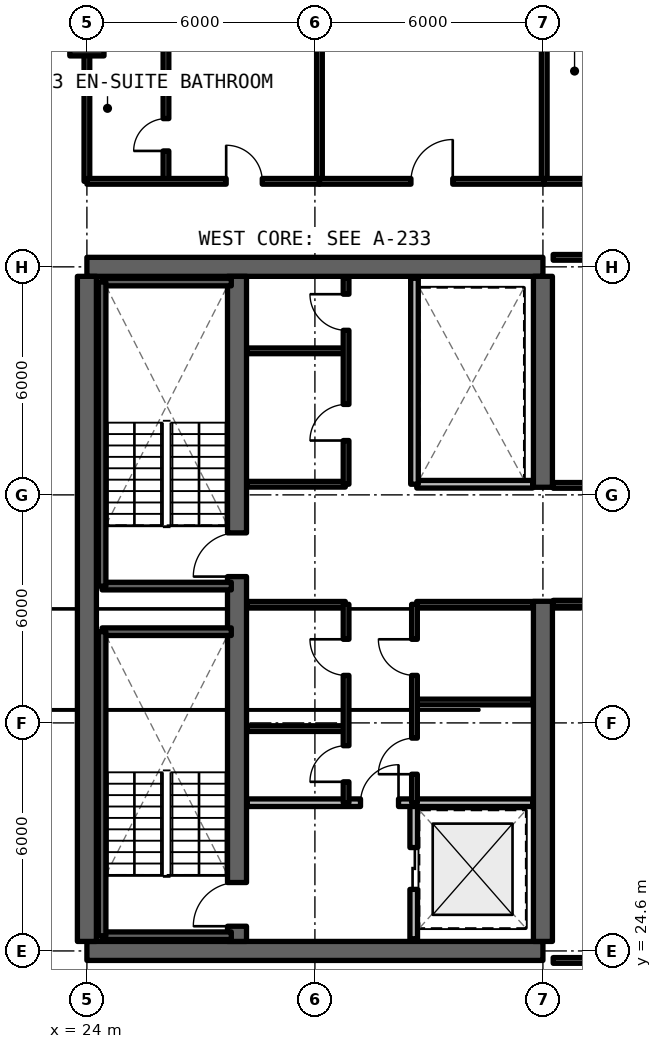
"""IFC4 building model, lengths in metres.
Left out: names, types, materials, properties, quantities, classifications, styles, units other than length and angle.
Written with IfcOpenShell. Run it as: python <this file> out.ifc"""

import sys

from ifc_helpers import new_model, si_unit, direction, frame, frame_2d, origin, origin_2d, place, context, subcontext, project, spatial, rectangle, extrude, element, fill, save


model = new_model("IFC4")
c1 = context("Model", 3, precision=1e-05, world=origin(), true_north=direction((0.0, 1.0)))
c2 = subcontext(c1, "Body", "Model", "MODEL_VIEW")
j1 = project(units=[si_unit("LENGTHUNIT", "METRE"), si_unit("PLANEANGLEUNIT", "RADIAN")], contexts=[c1])
p1 = place(None, origin())
s1 = spatial("IfcSite", under=j1, at=p1, CompositionType="ELEMENT")
p2 = place(p1, origin())
s2 = spatial("IfcBuilding", under=s1, at=p2, CompositionType="ELEMENT")
p3 = place(p2, frame((0.0, 0.0, 145.2)))
s3 = spatial("IfcBuildingStorey", under=s2, at=p3, CompositionType="ELEMENT", Elevation=145.2)
for number, where, z_axis, x_axis in (
    (1, (24.0, 24.6, 0.0), (0.0, 0.0, 1.0), (1.0, 0.0, 0.0)),
    (2, (36.0, 42.6, 0.0), (0.0, 0.0, 1.0), (-1.0, 0.0, 0.0)),
):
    element("IfcWall", number, at=place(p3, frame(where, z_axis=z_axis, x_axis=x_axis)), inside=s3, PredefinedType="SHEAR", context=c2, shape_type="SweptSolid", body=[
        extrude(rectangle(XDim=12.0, YDim=0.5, at=frame_2d((6.0, 0.0))), origin(), (0.0, 0.0, 1.0), 3.3),
    ])
p4 = place(p3, frame((24.0, 24.85, 0.0), z_axis=(0.0, 0.0, 1.0), x_axis=(0.0, 1.0, 0.0)))
e3 = element("IfcWall", 3, at=p4, inside=s3, PredefinedType="SHEAR", context=c2, shape_type="SweptSolid", body=[
    extrude(rectangle(XDim=17.5, YDim=0.5, at=frame_2d((8.75, 0.0))), origin(), (0.0, 0.0, 1.0), 3.3),
])
p5 = place(p3, frame((36.0, 24.85, 0.0), z_axis=(0.0, 0.0, 1.0), x_axis=(0.0, 1.0, 0.0)))
e4 = element("IfcWall", 4, at=p5, inside=s3, PredefinedType="SHEAR", context=c2, shape_type="SweptSolid", body=[
    extrude(rectangle(XDim=8.95, YDim=0.5, at=frame_2d((4.475, 0.0))), origin(), (0.0, 0.0, 1.0), 3.3),
])
p6 = place(p3, frame((36.0, 36.8, 0.0), z_axis=(0.0, 0.0, 1.0), x_axis=(0.0, 1.0, 0.0)))
e5 = element("IfcWall", 5, at=p6, inside=s3, PredefinedType="SHEAR", context=c2, shape_type="SweptSolid", body=[
    extrude(rectangle(XDim=5.55, YDim=0.5, at=frame_2d((2.775, 0.0))), origin(), (0.0, 0.0, 1.0), 3.3),
])
p7 = place(p3, frame((27.95, 24.85, 0.0), z_axis=(0.0, 0.0, 1.0), x_axis=(0.0, 1.0, 0.0)))
e6 = element("IfcWall", 6, at=p7, inside=s3, PredefinedType="SHEAR", context=c2, shape_type="SweptSolid", body=[
    extrude(rectangle(XDim=17.5, YDim=0.5, at=frame_2d((8.75, 0.0))), origin(), (0.0, 0.0, 1.0), 3.3),
])
p8 = place(p7, frame((0.4, 0.0, 0.0)))
e7 = element("IfcOpeningElement", 7, at=p8, cuts=e6, PredefinedType="OPENING", context=c2, shape_type="SweptSolid", body=[
    extrude(rectangle(XDim=1.15, YDim=2.15, at=frame_2d((0.575, 1.075))), frame((0.0, 0.26, 0.0), z_axis=(0.0, -1.0, 0.0), x_axis=(1.0, 0.0, 0.0)), (0.0, 0.0, 1.0), 0.52),
])
p9 = place(p7, frame((9.6, 0.0, 0.0)))
e8 = element("IfcOpeningElement", 8, at=p9, cuts=e6, PredefinedType="OPENING", context=c2, shape_type="SweptSolid", body=[
    extrude(rectangle(XDim=1.15, YDim=2.15, at=frame_2d((0.575, 1.075))), frame((0.0, 0.26, 0.0), z_axis=(0.0, -1.0, 0.0), x_axis=(1.0, 0.0, 0.0)), (0.0, 0.0, 1.0), 0.52),
])
p10 = place(p3, frame((24.0, 48.6, 0.0), z_axis=(0.0, 0.0, 1.0), x_axis=(1.0, 0.0, 0.0)))
e9 = element("IfcColumn", 9, at=p10, inside=s3, PredefinedType="COLUMN", context=c2, shape_type="SweptSolid", body=[
    extrude(rectangle(XDim=0.9, YDim=0.9, at=origin_2d()), origin(), (0.0, 0.0, 1.0), 3.3),
])
p11 = place(p3, frame((32.6, 24.92, 0.0), z_axis=(0.0, 0.0, 1.0), x_axis=(0.0, 1.0, 0.0)))
e10 = element("IfcWall", 10, at=p11, inside=s3, PredefinedType="SOLIDWALL", context=c2, shape_type="SweptSolid", body=[
    extrude(rectangle(XDim=3.58, YDim=0.2, at=frame_2d((1.79, 0.0))), origin(), (0.0, 0.0, 1.0), 2.35),
])
p12 = place(p11, frame((1.3, 0.0, 0.0)))
e11 = element("IfcOpeningElement", 11, at=p12, cuts=e10, PredefinedType="OPENING", context=c2, shape_type="SweptSolid", body=[
    extrude(rectangle(XDim=1.1, YDim=2.2, at=frame_2d((0.55, 1.1))), frame((0.0, 0.11, 0.0), z_axis=(0.0, -1.0, 0.0), x_axis=(1.0, 0.0, 0.0)), (0.0, 0.0, 1.0), 0.22),
])
p13 = place(p3, frame((28.22, 28.5, 0.0), z_axis=(0.0, 0.0, 1.0), x_axis=(1.0, 0.0, 0.0)))
e12 = element("IfcWall", 12, at=p13, inside=s3, PredefinedType="SOLIDWALL", context=c2, shape_type="SweptSolid", body=[
    extrude(rectangle(XDim=7.51, YDim=0.2, at=frame_2d((3.755, 0.0))), origin(), (0.0, 0.0, 1.0), 2.35),
])
p14 = place(p13, frame((2.98, 0.0, 0.0)))
e13 = element("IfcOpeningElement", 13, at=p14, cuts=e12, PredefinedType="OPENING", context=c2, shape_type="SweptSolid", body=[
    extrude(rectangle(XDim=1.0, YDim=2.15, at=frame_2d((0.5, 1.075))), frame((0.0, 0.11, 0.0), z_axis=(0.0, -1.0, 0.0), x_axis=(1.0, 0.0, 0.0)), (0.0, 0.0, 1.0), 0.22),
])
for number, where, z_axis, x_axis in (
    (14, (28.22, 30.45, 0.0), (0.0, 0.0, 1.0), (1.0, 0.0, 0.0)),
    (15, (28.22, 33.72, 0.0), (0.0, 0.0, 1.0), (1.0, 0.0, 0.0)),
):
    element("IfcWall", number, at=place(p3, frame(where, z_axis=z_axis, x_axis=x_axis)), inside=s3, PredefinedType="SOLIDWALL", context=c2, shape_type="SweptSolid", body=[
        extrude(rectangle(XDim=2.58, YDim=0.15, at=frame_2d((1.29, 0.0))), origin(), (0.0, 0.0, 1.0), 2.35),
    ])
p15 = place(p3, frame((30.82, 28.5, 0.0), z_axis=(0.0, 0.0, 1.0), x_axis=(0.0, 1.0, 0.0)))
e16 = element("IfcWall", 16, at=p15, inside=s3, PredefinedType="SOLIDWALL", context=c2, shape_type="SweptSolid", body=[
    extrude(rectangle(XDim=5.22, YDim=0.15, at=frame_2d((2.61, 0.0))), origin(), (0.0, 0.0, 1.0), 2.35),
])
p16 = place(p15, frame((0.55, 0.0, 0.0)))
e17 = element("IfcOpeningElement", 17, at=p16, cuts=e16, PredefinedType="OPENING", context=c2, shape_type="SweptSolid", body=[
    extrude(rectangle(XDim=0.95, YDim=2.15, at=frame_2d((0.475, 1.075))), frame((0.0, 0.085, 0.0), z_axis=(0.0, -1.0, 0.0), x_axis=(1.0, 0.0, 0.0)), (0.0, 0.0, 1.0), 0.17),
])
p17 = place(p15, frame((3.35, 0.0, 0.0)))
e18 = element("IfcOpeningElement", 18, at=p17, cuts=e16, PredefinedType="OPENING", context=c2, shape_type="SweptSolid", body=[
    extrude(rectangle(XDim=0.95, YDim=2.15, at=frame_2d((0.475, 1.075))), frame((0.0, 0.085, 0.0), z_axis=(0.0, -1.0, 0.0), x_axis=(1.0, 0.0, 0.0)), (0.0, 0.0, 1.0), 0.17),
])
for number, where, z_axis, x_axis in (
    (19, (32.68, 31.15, 0.0), (0.0, 0.0, 1.0), (1.0, 0.0, 0.0)),
    (20, (32.68, 33.72, 0.0), (0.0, 0.0, 1.0), (1.0, 0.0, 0.0)),
):
    element("IfcWall", number, at=place(p3, frame(where, z_axis=z_axis, x_axis=x_axis)), inside=s3, PredefinedType="SOLIDWALL", context=c2, shape_type="SweptSolid", body=[
        extrude(rectangle(XDim=3.05, YDim=0.15, at=frame_2d((1.525, 0.0))), origin(), (0.0, 0.0, 1.0), 2.35),
    ])
p18 = place(p3, frame((32.62, 28.5, 0.0), z_axis=(0.0, 0.0, 1.0), x_axis=(0.0, 1.0, 0.0)))
e21 = element("IfcWall", 21, at=p18, inside=s3, PredefinedType="SOLIDWALL", context=c2, shape_type="SweptSolid", body=[
    extrude(rectangle(XDim=5.22, YDim=0.15, at=frame_2d((2.61, 0.0))), origin(), (0.0, 0.0, 1.0), 2.35),
])
p19 = place(p18, frame((0.75, 0.0, 0.0)))
e22 = element("IfcOpeningElement", 22, at=p19, cuts=e21, PredefinedType="OPENING", context=c2, shape_type="SweptSolid", body=[
    extrude(rectangle(XDim=0.95, YDim=2.15, at=frame_2d((0.475, 1.075))), frame((0.0, 0.085, 0.0), z_axis=(0.0, -1.0, 0.0), x_axis=(1.0, 0.0, 0.0)), (0.0, 0.0, 1.0), 0.17),
])
p20 = place(p18, frame((3.35, 0.0, 0.0)))
e23 = element("IfcOpeningElement", 23, at=p20, cuts=e21, PredefinedType="OPENING", context=c2, shape_type="SweptSolid", body=[
    extrude(rectangle(XDim=0.95, YDim=2.15, at=frame_2d((0.475, 1.075))), frame((0.0, 0.085, 0.0), z_axis=(0.0, -1.0, 0.0), x_axis=(1.0, 0.0, 0.0)), (0.0, 0.0, 1.0), 0.17),
])
for number, where, z_axis, x_axis in (
    (24, (28.22, 36.88, 0.0), (0.0, 0.0, 1.0), (1.0, 0.0, 0.0)),
    (25, (28.22, 40.39, 0.0), (0.0, 0.0, 1.0), (1.0, 0.0, 0.0)),
):
    element("IfcWall", number, at=place(p3, frame(where, z_axis=z_axis, x_axis=x_axis)), inside=s3, PredefinedType="SOLIDWALL", context=c2, shape_type="SweptSolid", body=[
        extrude(rectangle(XDim=2.58, YDim=0.15, at=frame_2d((1.29, 0.0))), origin(), (0.0, 0.0, 1.0), 2.35),
    ])
p21 = place(p3, frame((30.82, 36.88, 0.0), z_axis=(0.0, 0.0, 1.0), x_axis=(0.0, 1.0, 0.0)))
e26 = element("IfcWall", 26, at=p21, inside=s3, PredefinedType="SOLIDWALL", context=c2, shape_type="SweptSolid", body=[
    extrude(rectangle(XDim=5.42, YDim=0.15, at=frame_2d((2.71, 0.0))), origin(), (0.0, 0.0, 1.0), 2.35),
])
p22 = place(p21, frame((1.15, 0.0, 0.0)))
e27 = element("IfcOpeningElement", 27, at=p22, cuts=e26, PredefinedType="OPENING", context=c2, shape_type="SweptSolid", body=[
    extrude(rectangle(XDim=0.95, YDim=2.15, at=frame_2d((0.475, 1.075))), frame((0.0, 0.085, 0.0), z_axis=(0.0, -1.0, 0.0), x_axis=(1.0, 0.0, 0.0)), (0.0, 0.0, 1.0), 0.17),
])
p23 = place(p21, frame((4.05, 0.0, 0.0)))
e28 = element("IfcOpeningElement", 28, at=p23, cuts=e26, PredefinedType="OPENING", context=c2, shape_type="SweptSolid", body=[
    extrude(rectangle(XDim=0.95, YDim=2.15, at=frame_2d((0.475, 1.075))), frame((0.0, 0.085, 0.0), z_axis=(0.0, -1.0, 0.0), x_axis=(1.0, 0.0, 0.0)), (0.0, 0.0, 1.0), 0.17),
])
p24 = place(p3, frame((32.68, 36.88, 0.0), z_axis=(0.0, 0.0, 1.0), x_axis=(1.0, 0.0, 0.0)))
e29 = element("IfcWall", 29, at=p24, inside=s3, PredefinedType="SOLIDWALL", context=c2, shape_type="SweptSolid", body=[
    extrude(rectangle(XDim=3.05, YDim=0.2, at=frame_2d((1.525, 0.0))), origin(), (0.0, 0.0, 1.0), 2.35),
])
p25 = place(p3, frame((32.62, 36.88, 0.0), z_axis=(0.0, 0.0, 1.0), x_axis=(0.0, 1.0, 0.0)))
e30 = element("IfcWall", 30, at=p25, inside=s3, PredefinedType="SOLIDWALL", context=c2, shape_type="SweptSolid", body=[
    extrude(rectangle(XDim=5.42, YDim=0.2, at=frame_2d((2.71, 0.0))), origin(), (0.0, 0.0, 1.0), 2.35),
])
p26 = place(p3, frame((36.27, 24.35, 0.0), z_axis=(0.0, 0.0, 1.0), x_axis=(1.0, 0.0, 0.0)))
e31 = element("IfcWall", 31, at=p26, inside=s3, PredefinedType="SOLIDWALL", context=c2, shape_type="SweptSolid", body=[
    extrude(rectangle(XDim=7.88, YDim=0.15, at=frame_2d((3.94, 0.0))), origin(), (0.0, 0.0, 1.0), 2.35),
])
p27 = place(p3, frame((36.27, 33.75, 0.0), z_axis=(0.0, 0.0, 1.0), x_axis=(1.0, 0.0, 0.0)))
e32 = element("IfcWall", 32, at=p27, inside=s3, PredefinedType="SOLIDWALL", context=c2, shape_type="SweptSolid", body=[
    extrude(rectangle(XDim=7.88, YDim=0.15, at=frame_2d((3.94, 0.0))), origin(), (0.0, 0.0, 1.0), 2.35),
])
p28 = place(p27, frame((3.465, 0.0, 0.0)))
e33 = element("IfcOpeningElement", 33, at=p28, cuts=e32, PredefinedType="OPENING", context=c2, shape_type="SweptSolid", body=[
    extrude(rectangle(XDim=0.95, YDim=2.15, at=frame_2d((0.475, 1.075))), frame((0.0, 0.085, 0.0), z_axis=(0.0, -1.0, 0.0), x_axis=(1.0, 0.0, 0.0)), (0.0, 0.0, 1.0), 0.17),
])
p29 = place(p3, frame((36.27, 36.85, 0.0), z_axis=(0.0, 0.0, 1.0), x_axis=(1.0, 0.0, 0.0)))
e34 = element("IfcWall", 34, at=p29, inside=s3, PredefinedType="SOLIDWALL", context=c2, shape_type="SweptSolid", body=[
    extrude(rectangle(XDim=7.88, YDim=0.15, at=frame_2d((3.94, 0.0))), origin(), (0.0, 0.0, 1.0), 2.35),
])
p30 = place(p29, frame((3.465, 0.0, 0.0)))
e35 = element("IfcOpeningElement", 35, at=p30, cuts=e34, PredefinedType="OPENING", context=c2, shape_type="SweptSolid", body=[
    extrude(rectangle(XDim=0.95, YDim=2.15, at=frame_2d((0.475, 1.075))), frame((0.0, 0.085, 0.0), z_axis=(0.0, -1.0, 0.0), x_axis=(1.0, 0.0, 0.0)), (0.0, 0.0, 1.0), 0.17),
])
p31 = place(p3, frame((36.27, 42.85, 0.0), z_axis=(0.0, 0.0, 1.0), x_axis=(1.0, 0.0, 0.0)))
e36 = element("IfcWall", 36, at=p31, inside=s3, PredefinedType="SOLIDWALL", context=c2, shape_type="SweptSolid", body=[
    extrude(rectangle(XDim=7.88, YDim=0.15, at=frame_2d((3.94, 0.0))), origin(), (0.0, 0.0, 1.0), 2.35),
])
for number, where, z_axis, x_axis in (
    (37, (24.0, 44.85, 0.0), (0.0, 0.0, 1.0), (0.0, 1.0, 0.0)),
    (38, (30.119, 44.85, 0.0), (0.0, 0.0, 1.0), (0.0, 1.0, 0.0)),
):
    element("IfcWall", number, at=place(p3, frame(where, z_axis=z_axis, x_axis=x_axis)), inside=s3, PredefinedType="SOLIDWALL", context=c2, shape_type="SweptSolid", body=[
        extrude(rectangle(XDim=10.2, YDim=0.15, at=frame_2d((5.1, 0.0))), origin(), (0.0, 0.0, 1.0), 2.35),
    ])
p32 = place(p3, frame((24.0, 47.3, 0.0), z_axis=(0.0, 0.0, 1.0), x_axis=(1.0, 0.0, 0.0)))
e39 = element("IfcWall", 39, at=p32, inside=s3, PredefinedType="PARTITIONING", context=c2, shape_type="SweptSolid", body=[
    extrude(rectangle(XDim=2.081, YDim=0.15, at=frame_2d((1.04, 0.0))), origin(), (0.0, 0.0, 1.0), 2.35),
])
p33 = place(p3, frame((26.081, 44.85, 0.0), z_axis=(0.0, 0.0, 1.0), x_axis=(0.0, 1.0, 0.0)))
e40 = element("IfcWall", 40, at=p33, inside=s3, PredefinedType="PARTITIONING", context=c2, shape_type="SweptSolid", body=[
    extrude(rectangle(XDim=10.2, YDim=0.15, at=frame_2d((5.1, 0.0))), origin(), (0.0, 0.0, 1.0), 2.35),
])
p34 = place(p33, frame((0.8, 0.0, 0.0)))
e41 = element("IfcOpeningElement", 41, at=p34, cuts=e40, PredefinedType="OPENING", context=c2, shape_type="SweptSolid", body=[
    extrude(rectangle(XDim=0.85, YDim=2.1, at=frame_2d((0.425, 1.05))), frame((0.0, 0.085, 0.0), z_axis=(0.0, -1.0, 0.0), x_axis=(1.0, 0.0, 0.0)), (0.0, 0.0, 1.0), 0.17),
])
p35 = place(p33, frame((5.21, 0.0, 0.0)))
e42 = element("IfcOpeningElement", 42, at=p35, cuts=e40, PredefinedType="OPENING", context=c2, shape_type="SweptSolid", body=[
    extrude(rectangle(XDim=0.85, YDim=2.1, at=frame_2d((0.425, 1.05))), frame((0.0, 0.085, 0.0), z_axis=(0.0, -1.0, 0.0), x_axis=(1.0, 0.0, 0.0)), (0.0, 0.0, 1.0), 0.17),
])
p36 = place(p3, frame((24.0, 44.85, 0.0), z_axis=(0.0, 0.0, 1.0), x_axis=(1.0, 0.0, 0.0)))
e43 = element("IfcWall", 43, at=p36, inside=s3, PredefinedType="SOLIDWALL", context=c2, shape_type="SweptSolid", body=[
    extrude(rectangle(XDim=6.119, YDim=0.15, at=frame_2d((3.06, 0.0))), origin(), (0.0, 0.0, 1.0), 2.35),
])
p37 = place(p36, frame((3.665, 0.0, 0.0)))
e44 = element("IfcOpeningElement", 44, at=p37, cuts=e43, PredefinedType="OPENING", context=c2, shape_type="SweptSolid", body=[
    extrude(rectangle(XDim=0.95, YDim=2.15, at=frame_2d((0.475, 1.075))), frame((0.0, 0.085, 0.0), z_axis=(0.0, -1.0, 0.0), x_axis=(1.0, 0.0, 0.0)), (0.0, 0.0, 1.0), 0.17),
])
p38 = place(p3, frame((36.035, 44.85, 0.0), z_axis=(0.0, 0.0, 1.0), x_axis=(0.0, 1.0, 0.0)))
e45 = element("IfcWall", 45, at=p38, inside=s3, PredefinedType="SOLIDWALL", context=c2, shape_type="SweptSolid", body=[
    extrude(rectangle(XDim=10.2, YDim=0.15, at=frame_2d((5.1, 0.0))), origin(), (0.0, 0.0, 1.0), 2.35),
])
p39 = place(p3, frame((30.119, 44.85, 0.0), z_axis=(0.0, 0.0, 1.0), x_axis=(1.0, 0.0, 0.0)))
e46 = element("IfcWall", 46, at=p39, inside=s3, PredefinedType="SOLIDWALL", context=c2, shape_type="SweptSolid", body=[
    extrude(rectangle(XDim=5.916, YDim=0.15, at=frame_2d((2.958, 0.0))), origin(), (0.0, 0.0, 1.0), 2.35),
])
p40 = place(p39, frame((2.408, 0.0, 0.0)))
e47 = element("IfcOpeningElement", 47, at=p40, cuts=e46, PredefinedType="OPENING", context=c2, shape_type="SweptSolid", body=[
    extrude(rectangle(XDim=1.1, YDim=2.15, at=frame_2d((0.55, 1.075))), frame((0.0, 0.085, 0.0), z_axis=(0.0, -1.0, 0.0), x_axis=(1.0, 0.0, 0.0)), (0.0, 0.0, 1.0), 0.17),
])
p41 = place(p3, frame((36.035, 44.85, 0.0), z_axis=(0.0, 0.0, 1.0), x_axis=(1.0, 0.0, 0.0)))
e48 = element("IfcWall", 48, at=p41, inside=s3, PredefinedType="SOLIDWALL", context=c2, shape_type="SweptSolid", body=[
    extrude(rectangle(XDim=7.445, YDim=0.15, at=frame_2d((3.723, 0.0))), origin(), (0.0, 0.0, 1.0), 2.35),
])
p42 = place(p41, frame((4.463, 0.0, 0.0)))
e49 = element("IfcOpeningElement", 49, at=p42, cuts=e48, PredefinedType="OPENING", context=c2, shape_type="SweptSolid", body=[
    extrude(rectangle(XDim=0.95, YDim=2.15, at=frame_2d((0.475, 1.075))), frame((0.0, 0.085, 0.0), z_axis=(0.0, -1.0, 0.0), x_axis=(1.0, 0.0, 0.0)), (0.0, 0.0, 1.0), 0.17),
])
for number, where, z_axis, x_axis in (
    (50, (24.4, 25.0, 0.0), (0.0, 0.0, 1.0), (1.0, 0.0, 0.0)),
    (51, (27.8, 33.0, 0.0), (0.0, 0.0, 1.0), (-1.0, 0.0, 0.0)),
):
    element("IfcWall", number, at=place(p3, frame(where, z_axis=z_axis, x_axis=x_axis)), inside=s3, PredefinedType="SOLIDWALL", context=c2, shape_type="SweptSolid", body=[
        extrude(rectangle(XDim=3.4, YDim=0.2, at=frame_2d((1.7, 0.0))), origin(), (0.0, 0.0, 1.0), 3.3),
    ])
p43 = place(p3, frame((24.4, 33.0, 0.0), z_axis=(0.0, 0.0, 1.0), x_axis=(0.0, -1.0, 0.0)))
e52 = element("IfcWall", 52, at=p43, inside=s3, PredefinedType="SOLIDWALL", context=c2, shape_type="SweptSolid", body=[
    extrude(rectangle(XDim=8.0, YDim=0.2, at=frame_2d((4.0, 0.0))), origin(), (0.0, 0.0, 1.0), 3.3),
])
for number, where, z_axis, x_axis in (
    (53, (24.4, 34.2, 0.0), (0.0, 0.0, 1.0), (1.0, 0.0, 0.0)),
    (54, (27.8, 42.2, 0.0), (0.0, 0.0, 1.0), (-1.0, 0.0, 0.0)),
):
    element("IfcWall", number, at=place(p3, frame(where, z_axis=z_axis, x_axis=x_axis)), inside=s3, PredefinedType="SOLIDWALL", context=c2, shape_type="SweptSolid", body=[
        extrude(rectangle(XDim=3.4, YDim=0.2, at=frame_2d((1.7, 0.0))), origin(), (0.0, 0.0, 1.0), 3.3),
    ])
p44 = place(p3, frame((24.4, 42.2, 0.0), z_axis=(0.0, 0.0, 1.0), x_axis=(0.0, -1.0, 0.0)))
e55 = element("IfcWall", 55, at=p44, inside=s3, PredefinedType="SOLIDWALL", context=c2, shape_type="SweptSolid", body=[
    extrude(rectangle(XDim=8.0, YDim=0.2, at=frame_2d((4.0, 0.0))), origin(), (0.0, 0.0, 1.0), 3.3),
])
p45 = place(p12, origin())
e56 = element("IfcDoor", 56, at=p45, inside=s3, OperationType="SLIDING_TO_LEFT", PredefinedType="DOOR", context=c2, shape_type="SweptSolid", body=[
    extrude(rectangle(XDim=1.1, YDim=2.2, at=frame_2d((0.55, 1.1))), frame((0.0, 0.025, 0.0), z_axis=(0.0, -1.0, 0.0), x_axis=(1.0, 0.0, 0.0)), (0.0, 0.0, 1.0), 0.05),
])
fill(e11, e56)
p46 = place(p14, origin())
e57 = element("IfcDoor", 57, at=p46, inside=s3, OperationType="SINGLE_SWING_RIGHT", PredefinedType="DOOR", context=c2, shape_type="SweptSolid", body=[
    extrude(rectangle(XDim=1.0, YDim=2.15, at=frame_2d((0.5, 1.075))), frame((0.0, 0.025, 0.0), z_axis=(0.0, -1.0, 0.0), x_axis=(1.0, 0.0, 0.0)), (0.0, 0.0, 1.0), 0.05),
])
fill(e13, e57)
p47 = place(p16, origin())
e58 = element("IfcDoor", 58, at=p47, inside=s3, OperationType="SINGLE_SWING_LEFT", PredefinedType="DOOR", context=c2, shape_type="SweptSolid", body=[
    extrude(rectangle(XDim=0.95, YDim=2.15, at=frame_2d((0.475, 1.075))), frame((0.0, 0.025, 0.0), z_axis=(0.0, -1.0, 0.0), x_axis=(1.0, 0.0, 0.0)), (0.0, 0.0, 1.0), 0.05),
])
fill(e17, e58)
p48 = place(p17, origin())
e59 = element("IfcDoor", 59, at=p48, inside=s3, OperationType="SINGLE_SWING_RIGHT", PredefinedType="DOOR", context=c2, shape_type="SweptSolid", body=[
    extrude(rectangle(XDim=0.95, YDim=2.15, at=frame_2d((0.475, 1.075))), frame((0.0, 0.025, 0.0), z_axis=(0.0, -1.0, 0.0), x_axis=(1.0, 0.0, 0.0)), (0.0, 0.0, 1.0), 0.05),
])
fill(e18, e59)
p49 = place(p19, origin())
e60 = element("IfcDoor", 60, at=p49, inside=s3, OperationType="SINGLE_SWING_LEFT", PredefinedType="DOOR", context=c2, shape_type="SweptSolid", body=[
    extrude(rectangle(XDim=0.95, YDim=2.15, at=frame_2d((0.475, 1.075))), frame((0.0, 0.025, 0.0), z_axis=(0.0, -1.0, 0.0), x_axis=(1.0, 0.0, 0.0)), (0.0, 0.0, 1.0), 0.05),
])
fill(e22, e60)
p50 = place(p20, origin())
e61 = element("IfcDoor", 61, at=p50, inside=s3, OperationType="SINGLE_SWING_RIGHT", PredefinedType="DOOR", context=c2, shape_type="SweptSolid", body=[
    extrude(rectangle(XDim=0.95, YDim=2.15, at=frame_2d((0.475, 1.075))), frame((0.0, 0.025, 0.0), z_axis=(0.0, -1.0, 0.0), x_axis=(1.0, 0.0, 0.0)), (0.0, 0.0, 1.0), 0.05),
])
fill(e23, e61)
p51 = place(p22, origin())
e62 = element("IfcDoor", 62, at=p51, inside=s3, OperationType="SINGLE_SWING_LEFT", PredefinedType="DOOR", context=c2, shape_type="SweptSolid", body=[
    extrude(rectangle(XDim=0.95, YDim=2.15, at=frame_2d((0.475, 1.075))), frame((0.0, 0.025, 0.0), z_axis=(0.0, -1.0, 0.0), x_axis=(1.0, 0.0, 0.0)), (0.0, 0.0, 1.0), 0.05),
])
fill(e27, e62)
p52 = place(p23, origin())
e63 = element("IfcDoor", 63, at=p52, inside=s3, OperationType="SINGLE_SWING_RIGHT", PredefinedType="DOOR", context=c2, shape_type="SweptSolid", body=[
    extrude(rectangle(XDim=0.95, YDim=2.15, at=frame_2d((0.475, 1.075))), frame((0.0, 0.025, 0.0), z_axis=(0.0, -1.0, 0.0), x_axis=(1.0, 0.0, 0.0)), (0.0, 0.0, 1.0), 0.05),
])
fill(e28, e63)
p53 = place(p34, origin())
e64 = element("IfcDoor", 64, at=p53, inside=s3, OperationType="SINGLE_SWING_LEFT", PredefinedType="DOOR", context=c2, shape_type="SweptSolid", body=[
    extrude(rectangle(XDim=0.85, YDim=2.1, at=frame_2d((0.425, 1.05))), frame((0.0, 0.025, 0.0), z_axis=(0.0, -1.0, 0.0), x_axis=(1.0, 0.0, 0.0)), (0.0, 0.0, 1.0), 0.05),
])
fill(e41, e64)
p54 = place(p37, origin())
e65 = element("IfcDoor", 65, at=p54, inside=s3, OperationType="SINGLE_SWING_LEFT", PredefinedType="DOOR", context=c2, shape_type="SweptSolid", body=[
    extrude(rectangle(XDim=0.95, YDim=2.15, at=frame_2d((0.475, 1.075))), frame((0.0, 0.025, 0.0), z_axis=(0.0, -1.0, 0.0), x_axis=(1.0, 0.0, 0.0)), (0.0, 0.0, 1.0), 0.05),
])
fill(e44, e65)
p55 = place(p40, origin())
e66 = element("IfcDoor", 66, at=p55, inside=s3, OperationType="SINGLE_SWING_RIGHT", PredefinedType="DOOR", context=c2, shape_type="SweptSolid", body=[
    extrude(rectangle(XDim=1.1, YDim=2.15, at=frame_2d((0.55, 1.075))), frame((0.0, 0.025, 0.0), z_axis=(0.0, -1.0, 0.0), x_axis=(1.0, 0.0, 0.0)), (0.0, 0.0, 1.0), 0.05),
])
fill(e47, e66)
p56 = place(p8, origin())
e67 = element("IfcDoor", 67, at=p56, inside=s3, OperationType="SINGLE_SWING_RIGHT", PredefinedType="DOOR", context=c2, shape_type="SweptSolid", body=[
    extrude(rectangle(XDim=1.15, YDim=2.15, at=frame_2d((0.575, 1.075))), frame((0.0, 0.025, 0.0), z_axis=(0.0, -1.0, 0.0), x_axis=(1.0, 0.0, 0.0)), (0.0, 0.0, 1.0), 0.05),
])
fill(e7, e67)
p57 = place(p9, origin())
e68 = element("IfcDoor", 68, at=p57, inside=s3, OperationType="SINGLE_SWING_LEFT", PredefinedType="DOOR", context=c2, shape_type="SweptSolid", body=[
    extrude(rectangle(XDim=1.15, YDim=2.15, at=frame_2d((0.575, 1.075))), frame((0.0, 0.025, 0.0), z_axis=(0.0, -1.0, 0.0), x_axis=(1.0, 0.0, 0.0)), (0.0, 0.0, 1.0), 0.05),
])
fill(e8, e68)
save(model, sys.argv[1])
